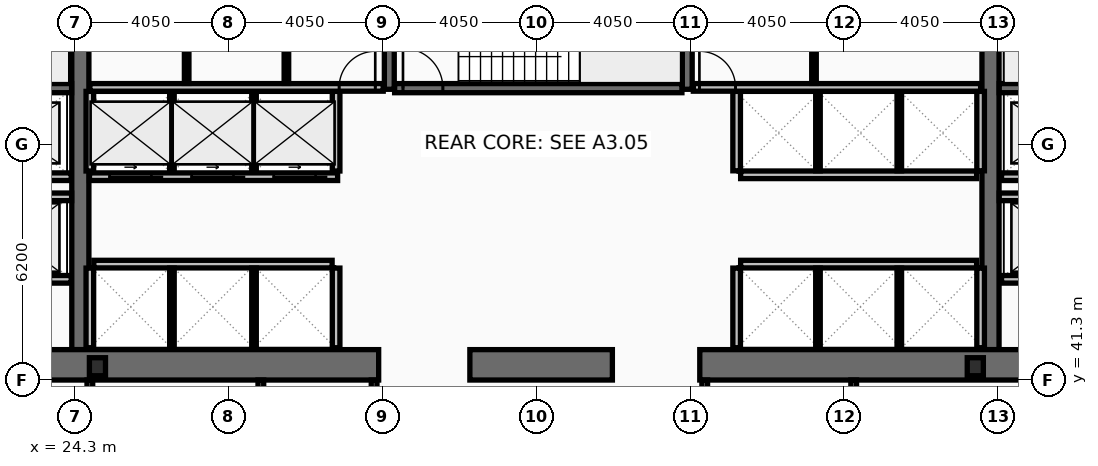
"""IFC4 building model, lengths in metres.
Left out: names, types, materials, properties, quantities, classifications, styles, units other than length and angle.
Written with IfcOpenShell. Run it as: python <this file> out.ifc"""

import sys

from ifc_helpers import new_model, si_unit, direction, frame, frame_2d, origin, origin_2d, place, context, subcontext, project, spatial, rectangle, i_section, extrude, element, fill, save


model = new_model("IFC4")
c1 = context("Model", 3, precision=1e-05, world=origin(), true_north=direction((0.0, 1.0)))
c2 = subcontext(c1, "Body", "Model", "MODEL_VIEW")
j1 = project(units=[si_unit("LENGTHUNIT", "METRE"), si_unit("PLANEANGLEUNIT", "RADIAN")], contexts=[c1])
p1 = place(None, origin())
s1 = spatial("IfcSite", under=j1, at=p1, CompositionType="ELEMENT")
p2 = place(p1, origin())
s2 = spatial("IfcBuilding", under=s1, at=p2, CompositionType="ELEMENT")
p3 = place(p2, frame((0.0, 0.0, 73.8)))
s3 = spatial("IfcBuildingStorey", under=s2, at=p3, CompositionType="ELEMENT", Elevation=73.8)
for number, where, z_axis, x_axis in (
    (1, (24.45, 42.1, 0.0), (0.0, 0.0, 1.0), (0.0, 1.0, 0.0)),
    (2, (48.4, 42.1, 0.0), (0.0, 0.0, 1.0), (0.0, 1.0, 0.0)),
):
    element("IfcWall", number, at=place(p3, frame(where, z_axis=z_axis, x_axis=x_axis)), inside=s3, PredefinedType="SHEAR", context=c2, shape_type="SweptSolid", body=[
        extrude(rectangle(XDim=10.8, YDim=0.45, at=frame_2d((5.4, 0.0))), origin(), (0.0, 0.0, 1.0), 3.82),
    ])
p4 = place(p3, frame((32.3, 41.7, 0.0), z_axis=(0.0, 0.0, 1.0), x_axis=(-1.0, 0.0, 0.0)))
e3 = element("IfcWall", 3, at=p4, inside=s3, PredefinedType="SHEAR", context=c2, shape_type="SweptSolid", body=[
    extrude(rectangle(XDim=11.45, YDim=0.8, at=frame_2d((5.725, 0.0))), origin(), (0.0, 0.0, 1.0), 3.82),
])
p5 = place(p3, frame((38.45, 41.7, 0.0), z_axis=(0.0, 0.0, 1.0), x_axis=(-1.0, 0.0, 0.0)))
e4 = element("IfcWall", 4, at=p5, inside=s3, PredefinedType="SHEAR", context=c2, shape_type="SweptSolid", body=[
    extrude(rectangle(XDim=3.75, YDim=0.8, at=frame_2d((1.875, 0.0))), origin(), (0.0, 0.0, 1.0), 3.82),
])
p6 = place(p3, frame((52.05, 41.7, 0.0), z_axis=(0.0, 0.0, 1.0), x_axis=(-1.0, 0.0, 0.0)))
e5 = element("IfcWall", 5, at=p6, inside=s3, PredefinedType="SHEAR", context=c2, shape_type="SweptSolid", body=[
    extrude(rectangle(XDim=11.3, YDim=0.8, at=frame_2d((5.65, 0.0))), origin(), (0.0, 0.0, 1.0), 3.82),
])
for number, where, z_axis, x_axis in (
    (6, (32.58, 48.95, 0.0), (0.0, 0.0, 1.0), (0.0, 1.0, 0.0)),
    (7, (40.42, 48.95, 0.0), (0.0, 0.0, 1.0), (0.0, 1.0, 0.0)),
):
    element("IfcWall", number, at=place(p3, frame(where, z_axis=z_axis, x_axis=x_axis)), inside=s3, PredefinedType="SHEAR", context=c2, shape_type="SweptSolid", body=[
        extrude(rectangle(XDim=3.95, YDim=0.26, at=frame_2d((1.975, 0.0))), origin(), (0.0, 0.0, 1.0), 3.82),
    ])
p7 = place(p3, frame((17.0, 48.98, 0.0), z_axis=(0.0, 0.0, 1.0), x_axis=(1.0, 0.0, 0.0)))
e8 = element("IfcWall", 8, at=p7, inside=s3, PredefinedType="SHEAR", context=c2, shape_type="SweptSolid", body=[
    extrude(rectangle(XDim=7.22, YDim=0.24, at=frame_2d((3.61, 0.0))), origin(), (0.0, 0.0, 1.0), 3.82),
])
p8 = place(p7, frame((0.22, 0.0, 0.0)))
e9 = element("IfcOpeningElement", 9, at=p8, cuts=e8, PredefinedType="OPENING", context=c2, shape_type="SweptSolid", body=[
    extrude(rectangle(XDim=1.05, YDim=2.15, at=frame_2d((0.525, 1.075))), frame((0.0, 0.13, 0.0), z_axis=(0.0, -1.0, 0.0), x_axis=(1.0, 0.0, 0.0)), (0.0, 0.0, 1.0), 0.26),
])
p9 = place(p3, frame((48.63, 48.98, 0.0), z_axis=(0.0, 0.0, 1.0), x_axis=(1.0, 0.0, 0.0)))
e10 = element("IfcWall", 10, at=p9, inside=s3, PredefinedType="SHEAR", context=c2, shape_type="SweptSolid", body=[
    extrude(rectangle(XDim=7.27, YDim=0.24, at=frame_2d((3.635, 0.0))), origin(), (0.0, 0.0, 1.0), 3.82),
])
p10 = place(p9, frame((6.0, 0.0, 0.0)))
e11 = element("IfcOpeningElement", 11, at=p10, cuts=e10, PredefinedType="OPENING", context=c2, shape_type="SweptSolid", body=[
    extrude(rectangle(XDim=1.05, YDim=2.15, at=frame_2d((0.525, 1.075))), frame((0.0, 0.13, 0.0), z_axis=(0.0, -1.0, 0.0), x_axis=(1.0, 0.0, 0.0)), (0.0, 0.0, 1.0), 0.26),
])
p11 = place(p3, frame((32.72, 48.98, 0.0), z_axis=(0.0, 0.0, 1.0), x_axis=(1.0, 0.0, 0.0)))
e12 = element("IfcWall", 12, at=p11, inside=s3, PredefinedType="SHEAR", context=c2, shape_type="SweptSolid", body=[
    extrude(rectangle(XDim=7.56, YDim=0.24, at=frame_2d((3.78, 0.0))), origin(), (0.0, 0.0, 1.0), 3.82),
])
p12 = place(p11, frame((0.22, 0.0, 0.0)))
e13 = element("IfcOpeningElement", 13, at=p12, cuts=e12, PredefinedType="OPENING", context=c2, shape_type="SweptSolid", body=[
    extrude(rectangle(XDim=1.05, YDim=2.15, at=frame_2d((0.525, 1.075))), frame((0.0, 0.13, 0.0), z_axis=(0.0, -1.0, 0.0), x_axis=(1.0, 0.0, 0.0)), (0.0, 0.0, 1.0), 0.26),
])
for number, where, z_axis, x_axis in (
    (14, (24.9, 41.65, 0.0), (0.0, 0.0, 1.0), (1.0, 0.0, 0.0)),
    (15, (48.0, 41.65, 0.0), (0.0, 0.0, 1.0), (1.0, 0.0, 0.0)),
):
    element("IfcColumn", number, at=place(p3, frame(where, z_axis=z_axis, x_axis=x_axis)), inside=s3, PredefinedType="COLUMN", context=c2, shape_type="SweptSolid", body=[
        extrude(i_section(OverallWidth=0.424, OverallDepth=0.474, WebThickness=0.048, FlangeThickness=0.077, at=origin_2d()), origin(), (0.0, 0.0, 1.0), 4.0),
    ])
p13 = place(p3, frame((51.61, 43.95, 0.0), z_axis=(0.0, 0.0, 1.0), x_axis=(-1.0, 0.0, 0.0)))
e16 = element("IfcWall", 16, at=p13, inside=s3, PredefinedType="PARTITIONING", context=c2, shape_type="SweptSolid", body=[
    extrude(rectangle(XDim=2.92, YDim=0.2, at=frame_2d((1.46, 0.0))), origin(), (0.0, 0.0, 1.0), 3.82),
])
p14 = place(p13, frame((0.81, 0.0, 0.0)))
e17 = element("IfcOpeningElement", 17, at=p14, cuts=e16, PredefinedType="OPENING", context=c2, shape_type="SweptSolid", body=[
    extrude(rectangle(XDim=1.3, YDim=2.18, at=frame_2d((0.65, 1.09))), frame((0.0, 0.11, 0.0), z_axis=(0.0, -1.0, 0.0), x_axis=(1.0, 0.0, 0.0)), (0.0, 0.0, 1.0), 0.22),
])
p15 = place(p3, frame((24.21, 43.95, 0.0), z_axis=(0.0, 0.0, 1.0), x_axis=(-1.0, 0.0, 0.0)))
e18 = element("IfcWall", 18, at=p15, inside=s3, PredefinedType="PARTITIONING", context=c2, shape_type="SweptSolid", body=[
    extrude(rectangle(XDim=2.97, YDim=0.2, at=frame_2d((1.485, 0.0))), origin(), (0.0, 0.0, 1.0), 3.82),
])
p16 = place(p15, frame((0.86, 0.0, 0.0)))
e19 = element("IfcOpeningElement", 19, at=p16, cuts=e18, PredefinedType="OPENING", context=c2, shape_type="SweptSolid", body=[
    extrude(rectangle(XDim=1.3, YDim=2.18, at=frame_2d((0.65, 1.09))), frame((0.0, 0.11, 0.0), z_axis=(0.0, -1.0, 0.0), x_axis=(1.0, 0.0, 0.0)), (0.0, 0.0, 1.0), 0.22),
])
p17 = place(p3, frame((51.61, 46.65, 0.0), z_axis=(0.0, 0.0, 1.0), x_axis=(-1.0, 0.0, 0.0)))
e20 = element("IfcWall", 20, at=p17, inside=s3, PredefinedType="PARTITIONING", context=c2, shape_type="SweptSolid", body=[
    extrude(rectangle(XDim=2.92, YDim=0.2, at=frame_2d((1.46, 0.0))), origin(), (0.0, 0.0, 1.0), 3.82),
])
p18 = place(p17, frame((0.86, 0.0, 0.0)))
e21 = element("IfcOpeningElement", 21, at=p18, cuts=e20, PredefinedType="OPENING", context=c2, shape_type="SweptSolid", body=[
    extrude(rectangle(XDim=1.2, YDim=2.18, at=frame_2d((0.6, 1.09))), frame((0.0, 0.11, 0.0), z_axis=(0.0, -1.0, 0.0), x_axis=(1.0, 0.0, 0.0)), (0.0, 0.0, 1.0), 0.22),
])
p19 = place(p3, frame((24.21, 46.65, 0.0), z_axis=(0.0, 0.0, 1.0), x_axis=(-1.0, 0.0, 0.0)))
e22 = element("IfcWall", 22, at=p19, inside=s3, PredefinedType="PARTITIONING", context=c2, shape_type="SweptSolid", body=[
    extrude(rectangle(XDim=2.97, YDim=0.2, at=frame_2d((1.485, 0.0))), origin(), (0.0, 0.0, 1.0), 3.82),
])
p20 = place(p19, frame((0.91, 0.0, 0.0)))
e23 = element("IfcOpeningElement", 23, at=p20, cuts=e22, PredefinedType="OPENING", context=c2, shape_type="SweptSolid", body=[
    extrude(rectangle(XDim=1.2, YDim=2.18, at=frame_2d((0.6, 1.09))), frame((0.0, 0.11, 0.0), z_axis=(0.0, -1.0, 0.0), x_axis=(1.0, 0.0, 0.0)), (0.0, 0.0, 1.0), 0.22),
])
p21 = place(p3, frame((31.22, 46.65, 0.0), z_axis=(0.0, 0.0, 1.0), x_axis=(-1.0, 0.0, 0.0)))
e24 = element("IfcWall", 24, at=p21, inside=s3, PredefinedType="PARTITIONING", context=c2, shape_type="SweptSolid", body=[
    extrude(rectangle(XDim=6.53, YDim=0.2, at=frame_2d((3.265, 0.0))), origin(), (0.0, 0.0, 1.0), 3.82),
])
p22 = place(p21, frame((4.9, 0.0, 0.0)))
e25 = element("IfcOpeningElement", 25, at=p22, cuts=e24, PredefinedType="OPENING", context=c2, shape_type="SweptSolid", body=[
    extrude(rectangle(XDim=1.1, YDim=2.18, at=frame_2d((0.55, 1.09))), frame((0.0, 0.11, 0.0), z_axis=(0.0, -1.0, 0.0), x_axis=(1.0, 0.0, 0.0)), (0.0, 0.0, 1.0), 0.22),
])
p23 = place(p21, frame((2.74, 0.0, 0.0)))
e26 = element("IfcOpeningElement", 26, at=p23, cuts=e24, PredefinedType="OPENING", context=c2, shape_type="SweptSolid", body=[
    extrude(rectangle(XDim=1.1, YDim=2.18, at=frame_2d((0.55, 1.09))), frame((0.0, 0.11, 0.0), z_axis=(0.0, -1.0, 0.0), x_axis=(1.0, 0.0, 0.0)), (0.0, 0.0, 1.0), 0.22),
])
p24 = place(p21, frame((0.58, 0.0, 0.0)))
e27 = element("IfcOpeningElement", 27, at=p24, cuts=e24, PredefinedType="OPENING", context=c2, shape_type="SweptSolid", body=[
    extrude(rectangle(XDim=1.1, YDim=2.18, at=frame_2d((0.55, 1.09))), frame((0.0, 0.11, 0.0), z_axis=(0.0, -1.0, 0.0), x_axis=(1.0, 0.0, 0.0)), (0.0, 0.0, 1.0), 0.22),
])
p25 = place(p3, frame((21.2, 46.12, 0.0), z_axis=(0.0, 0.0, 1.0), x_axis=(1.0, 0.0, 0.0)))
e28 = element("IfcWall", 28, at=p25, inside=s3, PredefinedType="PARTITIONING", context=c2, shape_type="SweptSolid", body=[
    extrude(rectangle(XDim=3.02, YDim=0.2, at=frame_2d((1.51, 0.0))), origin(), (0.0, 0.0, 1.0), 3.82),
])
p26 = place(p3, frame((48.63, 46.12, 0.0), z_axis=(0.0, 0.0, 1.0), x_axis=(1.0, 0.0, 0.0)))
e29 = element("IfcWall", 29, at=p26, inside=s3, PredefinedType="PARTITIONING", context=c2, shape_type="SweptSolid", body=[
    extrude(rectangle(XDim=3.07, YDim=0.2, at=frame_2d((1.535, 0.0))), origin(), (0.0, 0.0, 1.0), 3.82),
])
for number, where, z_axis, x_axis in (
    (30, (24.7, 46.8, 0.0), (0.0, 0.0, 1.0), (0.0, 1.0, 0.0)),
    (31, (31.18, 46.8, 0.0), (0.0, 0.0, 1.0), (0.0, 1.0, 0.0)),
):
    element("IfcWall", number, at=place(p3, frame(where, z_axis=z_axis, x_axis=x_axis)), inside=s3, PredefinedType="PARTITIONING", context=c2, shape_type="SweptSolid", body=[
        extrude(rectangle(XDim=2.095, YDim=0.2, at=frame_2d((1.047, 0.0))), origin(), (0.0, 0.0, 1.0), 3.82),
    ])
for number, where, z_axis, x_axis in (
    (32, (26.86, 46.8, 0.0), (0.0, 0.0, 1.0), (0.0, 1.0, 0.0)),
    (33, (29.02, 46.8, 0.0), (0.0, 0.0, 1.0), (0.0, 1.0, 0.0)),
):
    element("IfcWall", number, at=place(p3, frame(where, z_axis=z_axis, x_axis=x_axis)), inside=s3, PredefinedType="PARTITIONING", context=c2, shape_type="SweptSolid", body=[
        extrude(rectangle(XDim=2.095, YDim=0.12, at=frame_2d((1.047, 0.0))), origin(), (0.0, 0.0, 1.0), 3.82),
    ])
p27 = place(p3, frame((24.805, 44.35, 0.0), z_axis=(0.0, 0.0, 1.0), x_axis=(1.0, 0.0, 0.0)))
e34 = element("IfcWall", 34, at=p27, inside=s3, PredefinedType="PARTITIONING", context=c2, shape_type="SweptSolid", body=[
    extrude(rectangle(XDim=6.27, YDim=0.2, at=frame_2d((3.135, 0.0))), origin(), (0.0, 0.0, 1.0), 3.82),
])
for number, where, z_axis, x_axis in (
    (35, (24.7, 42.15, 0.0), (0.0, 0.0, 1.0), (0.0, 1.0, 0.0)),
    (36, (31.18, 42.15, 0.0), (0.0, 0.0, 1.0), (0.0, 1.0, 0.0)),
):
    element("IfcWall", number, at=place(p3, frame(where, z_axis=z_axis, x_axis=x_axis)), inside=s3, PredefinedType="PARTITIONING", context=c2, shape_type="SweptSolid", body=[
        extrude(rectangle(XDim=2.095, YDim=0.2, at=frame_2d((1.048, 0.0))), origin(), (0.0, 0.0, 1.0), 3.82),
    ])
for number, where, z_axis, x_axis in (
    (37, (26.86, 42.15, 0.0), (0.0, 0.0, 1.0), (0.0, 1.0, 0.0)),
    (38, (29.02, 42.15, 0.0), (0.0, 0.0, 1.0), (0.0, 1.0, 0.0)),
):
    element("IfcWall", number, at=place(p3, frame(where, z_axis=z_axis, x_axis=x_axis)), inside=s3, PredefinedType="PARTITIONING", context=c2, shape_type="SweptSolid", body=[
        extrude(rectangle(XDim=2.095, YDim=0.12, at=frame_2d((1.048, 0.0))), origin(), (0.0, 0.0, 1.0), 3.82),
    ])
p28 = place(p3, frame((41.825, 46.7, 0.0), z_axis=(0.0, 0.0, 1.0), x_axis=(1.0, 0.0, 0.0)))
e39 = element("IfcWall", 39, at=p28, inside=s3, PredefinedType="PARTITIONING", context=c2, shape_type="SweptSolid", body=[
    extrude(rectangle(XDim=6.21, YDim=0.2, at=frame_2d((3.105, 0.0))), origin(), (0.0, 0.0, 1.0), 3.82),
])
for number, where, z_axis, x_axis in (
    (40, (41.72, 46.805, 0.0), (0.0, 0.0, 1.0), (0.0, 1.0, 0.0)),
    (41, (48.14, 46.805, 0.0), (0.0, 0.0, 1.0), (0.0, 1.0, 0.0)),
):
    element("IfcWall", number, at=place(p3, frame(where, z_axis=z_axis, x_axis=x_axis)), inside=s3, PredefinedType="PARTITIONING", context=c2, shape_type="SweptSolid", body=[
        extrude(rectangle(XDim=2.09, YDim=0.2, at=frame_2d((1.045, 0.0))), origin(), (0.0, 0.0, 1.0), 3.82),
    ])
for number, where, z_axis, x_axis in (
    (42, (43.86, 46.805, 0.0), (0.0, 0.0, 1.0), (0.0, 1.0, 0.0)),
    (43, (46.0, 46.805, 0.0), (0.0, 0.0, 1.0), (0.0, 1.0, 0.0)),
):
    element("IfcWall", number, at=place(p3, frame(where, z_axis=z_axis, x_axis=x_axis)), inside=s3, PredefinedType="PARTITIONING", context=c2, shape_type="SweptSolid", body=[
        extrude(rectangle(XDim=2.09, YDim=0.12, at=frame_2d((1.045, 0.0))), origin(), (0.0, 0.0, 1.0), 3.82),
    ])
p29 = place(p3, frame((41.825, 44.35, 0.0), z_axis=(0.0, 0.0, 1.0), x_axis=(1.0, 0.0, 0.0)))
e44 = element("IfcWall", 44, at=p29, inside=s3, PredefinedType="PARTITIONING", context=c2, shape_type="SweptSolid", body=[
    extrude(rectangle(XDim=6.21, YDim=0.2, at=frame_2d((3.105, 0.0))), origin(), (0.0, 0.0, 1.0), 3.82),
])
for number, where, z_axis, x_axis in (
    (45, (41.72, 42.15, 0.0), (0.0, 0.0, 1.0), (0.0, 1.0, 0.0)),
    (46, (48.14, 42.15, 0.0), (0.0, 0.0, 1.0), (0.0, 1.0, 0.0)),
):
    element("IfcWall", number, at=place(p3, frame(where, z_axis=z_axis, x_axis=x_axis)), inside=s3, PredefinedType="PARTITIONING", context=c2, shape_type="SweptSolid", body=[
        extrude(rectangle(XDim=2.095, YDim=0.2, at=frame_2d((1.048, 0.0))), origin(), (0.0, 0.0, 1.0), 3.82),
    ])
for number, where, z_axis, x_axis in (
    (47, (43.86, 42.15, 0.0), (0.0, 0.0, 1.0), (0.0, 1.0, 0.0)),
    (48, (46.0, 42.15, 0.0), (0.0, 0.0, 1.0), (0.0, 1.0, 0.0)),
):
    element("IfcWall", number, at=place(p3, frame(where, z_axis=z_axis, x_axis=x_axis)), inside=s3, PredefinedType="PARTITIONING", context=c2, shape_type="SweptSolid", body=[
        extrude(rectangle(XDim=2.095, YDim=0.12, at=frame_2d((1.048, 0.0))), origin(), (0.0, 0.0, 1.0), 3.82),
    ])
p30 = place(p3, frame((24.7, 49.0, 0.0), z_axis=(0.0, 0.0, 1.0), x_axis=(1.0, 0.0, 0.0)))
e49 = element("IfcWall", 49, at=p30, inside=s3, PredefinedType="PARTITIONING", context=c2, shape_type="SweptSolid", body=[
    extrude(rectangle(XDim=7.72, YDim=0.2, at=frame_2d((3.86, 0.0))), origin(), (0.0, 0.0, 1.0), 3.82),
])
p31 = place(p30, frame((6.56, 0.0, 0.0)))
e50 = element("IfcOpeningElement", 50, at=p31, cuts=e49, PredefinedType="OPENING", context=c2, shape_type="SweptSolid", body=[
    extrude(rectangle(XDim=0.95, YDim=2.1, at=frame_2d((0.475, 1.05))), frame((0.0, 0.11, 0.0), z_axis=(0.0, -1.0, 0.0), x_axis=(1.0, 0.0, 0.0)), (0.0, 0.0, 1.0), 0.22),
])
p32 = place(p3, frame((27.248, 49.105, 0.0), z_axis=(0.0, 0.0, 1.0), x_axis=(0.0, 1.0, 0.0)))
e51 = element("IfcWall", 51, at=p32, inside=s3, PredefinedType="PARTITIONING", context=c2, shape_type="SweptSolid", body=[
    extrude(rectangle(XDim=3.69, YDim=0.12, at=frame_2d((1.845, 0.0))), origin(), (0.0, 0.0, 1.0), 3.82),
])
p33 = place(p32, frame((1.05, 0.0, 0.0)))
e52 = element("IfcOpeningElement", 52, at=p33, cuts=e51, PredefinedType="OPENING", context=c2, shape_type="SweptSolid", body=[
    extrude(rectangle(XDim=0.9, YDim=2.05, at=frame_2d((0.45, 1.025))), frame((0.0, 0.07, 0.0), z_axis=(0.0, -1.0, 0.0), x_axis=(1.0, 0.0, 0.0)), (0.0, 0.0, 1.0), 0.14),
])
p34 = place(p3, frame((29.872, 49.105, 0.0), z_axis=(0.0, 0.0, 1.0), x_axis=(0.0, 1.0, 0.0)))
e53 = element("IfcWall", 53, at=p34, inside=s3, PredefinedType="PARTITIONING", context=c2, shape_type="SweptSolid", body=[
    extrude(rectangle(XDim=3.69, YDim=0.12, at=frame_2d((1.845, 0.0))), origin(), (0.0, 0.0, 1.0), 3.82),
])
p35 = place(p34, frame((1.05, 0.0, 0.0)))
e54 = element("IfcOpeningElement", 54, at=p35, cuts=e53, PredefinedType="OPENING", context=c2, shape_type="SweptSolid", body=[
    extrude(rectangle(XDim=0.9, YDim=2.05, at=frame_2d((0.45, 1.025))), frame((0.0, 0.07, 0.0), z_axis=(0.0, -1.0, 0.0), x_axis=(1.0, 0.0, 0.0)), (0.0, 0.0, 1.0), 0.14),
])
p36 = place(p3, frame((40.58, 49.0, 0.0), z_axis=(0.0, 0.0, 1.0), x_axis=(1.0, 0.0, 0.0)))
e55 = element("IfcWall", 55, at=p36, inside=s3, PredefinedType="PARTITIONING", context=c2, shape_type="SweptSolid", body=[
    extrude(rectangle(XDim=7.56, YDim=0.2, at=frame_2d((3.78, 0.0))), origin(), (0.0, 0.0, 1.0), 3.82),
])
p37 = place(p36, frame((0.16, 0.0, 0.0)))
e56 = element("IfcOpeningElement", 56, at=p37, cuts=e55, PredefinedType="OPENING", context=c2, shape_type="SweptSolid", body=[
    extrude(rectangle(XDim=0.95, YDim=2.1, at=frame_2d((0.475, 1.05))), frame((0.0, 0.11, 0.0), z_axis=(0.0, -1.0, 0.0), x_axis=(1.0, 0.0, 0.0)), (0.0, 0.0, 1.0), 0.22),
])
p38 = place(p3, frame((43.755, 49.105, 0.0), z_axis=(0.0, 0.0, 1.0), x_axis=(0.0, 1.0, 0.0)))
e57 = element("IfcWall", 57, at=p38, inside=s3, PredefinedType="PARTITIONING", context=c2, shape_type="SweptSolid", body=[
    extrude(rectangle(XDim=3.69, YDim=0.12, at=frame_2d((1.845, 0.0))), origin(), (0.0, 0.0, 1.0), 3.82),
])
p39 = place(p38, frame((1.05, 0.0, 0.0)))
e58 = element("IfcOpeningElement", 58, at=p39, cuts=e57, PredefinedType="OPENING", context=c2, shape_type="SweptSolid", body=[
    extrude(rectangle(XDim=0.9, YDim=2.05, at=frame_2d((0.45, 1.025))), frame((0.0, 0.07, 0.0), z_axis=(0.0, -1.0, 0.0), x_axis=(1.0, 0.0, 0.0)), (0.0, 0.0, 1.0), 0.14),
])
p40 = place(p3, frame((24.7, 38.28, 0.0), z_axis=(0.0, 0.0, 1.0), x_axis=(0.0, 1.0, 0.0)))
e59 = element("IfcWall", 59, at=p40, inside=s3, PredefinedType="PARTITIONING", context=c2, shape_type="SweptSolid", body=[
    extrude(rectangle(XDim=3.02, YDim=0.15, at=frame_2d((1.51, 0.0))), origin(), (0.0, 0.0, 1.0), 3.01),
])
for number, where, z_axis, x_axis in (
    (60, (29.2, 38.28, 0.0), (0.0, 0.0, 1.0), (0.0, 1.0, 0.0)),
    (61, (32.18, 38.28, 0.0), (0.0, 0.0, 1.0), (0.0, 1.0, 0.0)),
    (62, (40.88, 38.28, 0.0), (0.0, 0.0, 1.0), (0.0, 1.0, 0.0)),
    (63, (44.8, 38.28, 0.0), (0.0, 0.0, 1.0), (0.0, 1.0, 0.0)),
):
    element("IfcWall", number, at=place(p3, frame(where, z_axis=z_axis, x_axis=x_axis)), inside=s3, PredefinedType="PARTITIONING", context=c2, shape_type="SweptSolid", body=[
        extrude(rectangle(XDim=3.02, YDim=0.15, at=frame_2d((1.51, 0.0))), origin(), (0.0, 0.0, 1.0), 3.82),
    ])
p41 = place(p12, origin())
e64 = element("IfcDoor", 64, at=p41, inside=s3, OperationType="SINGLE_SWING_LEFT", PredefinedType="DOOR", context=c2, shape_type="SweptSolid", body=[
    extrude(rectangle(XDim=1.05, YDim=2.15, at=frame_2d((0.525, 1.075))), frame((0.0, 0.025, 0.0), z_axis=(0.0, -1.0, 0.0), x_axis=(1.0, 0.0, 0.0)), (0.0, 0.0, 1.0), 0.05),
])
fill(e13, e64)
p42 = place(p22, origin())
e65 = element("IfcDoor", 65, at=p42, inside=s3, OperationType="SLIDING_TO_LEFT", PredefinedType="DOOR", context=c2, shape_type="SweptSolid", body=[
    extrude(rectangle(XDim=1.1, YDim=2.18, at=frame_2d((0.55, 1.09))), frame((0.0, 0.025, 0.0), z_axis=(0.0, -1.0, 0.0), x_axis=(1.0, 0.0, 0.0)), (0.0, 0.0, 1.0), 0.05),
])
fill(e25, e65)
p43 = place(p23, origin())
e66 = element("IfcDoor", 66, at=p43, inside=s3, OperationType="SLIDING_TO_LEFT", PredefinedType="DOOR", context=c2, shape_type="SweptSolid", body=[
    extrude(rectangle(XDim=1.1, YDim=2.18, at=frame_2d((0.55, 1.09))), frame((0.0, 0.025, 0.0), z_axis=(0.0, -1.0, 0.0), x_axis=(1.0, 0.0, 0.0)), (0.0, 0.0, 1.0), 0.05),
])
fill(e26, e66)
p44 = place(p24, origin())
e67 = element("IfcDoor", 67, at=p44, inside=s3, OperationType="SLIDING_TO_LEFT", PredefinedType="DOOR", context=c2, shape_type="SweptSolid", body=[
    extrude(rectangle(XDim=1.1, YDim=2.18, at=frame_2d((0.55, 1.09))), frame((0.0, 0.025, 0.0), z_axis=(0.0, -1.0, 0.0), x_axis=(1.0, 0.0, 0.0)), (0.0, 0.0, 1.0), 0.05),
])
fill(e27, e67)
p45 = place(p31, origin())
e68 = element("IfcDoor", 68, at=p45, inside=s3, OperationType="SINGLE_SWING_RIGHT", PredefinedType="DOOR", context=c2, shape_type="SweptSolid", body=[
    extrude(rectangle(XDim=0.95, YDim=2.1, at=frame_2d((0.475, 1.05))), frame((0.0, 0.025, 0.0), z_axis=(0.0, -1.0, 0.0), x_axis=(1.0, 0.0, 0.0)), (0.0, 0.0, 1.0), 0.05),
])
fill(e50, e68)
p46 = place(p37, origin())
e69 = element("IfcDoor", 69, at=p46, inside=s3, OperationType="SINGLE_SWING_LEFT", PredefinedType="DOOR", context=c2, shape_type="SweptSolid", body=[
    extrude(rectangle(XDim=0.95, YDim=2.1, at=frame_2d((0.475, 1.05))), frame((0.0, 0.025, 0.0), z_axis=(0.0, -1.0, 0.0), x_axis=(1.0, 0.0, 0.0)), (0.0, 0.0, 1.0), 0.05),
])
fill(e56, e69)
save(model, sys.argv[1])
